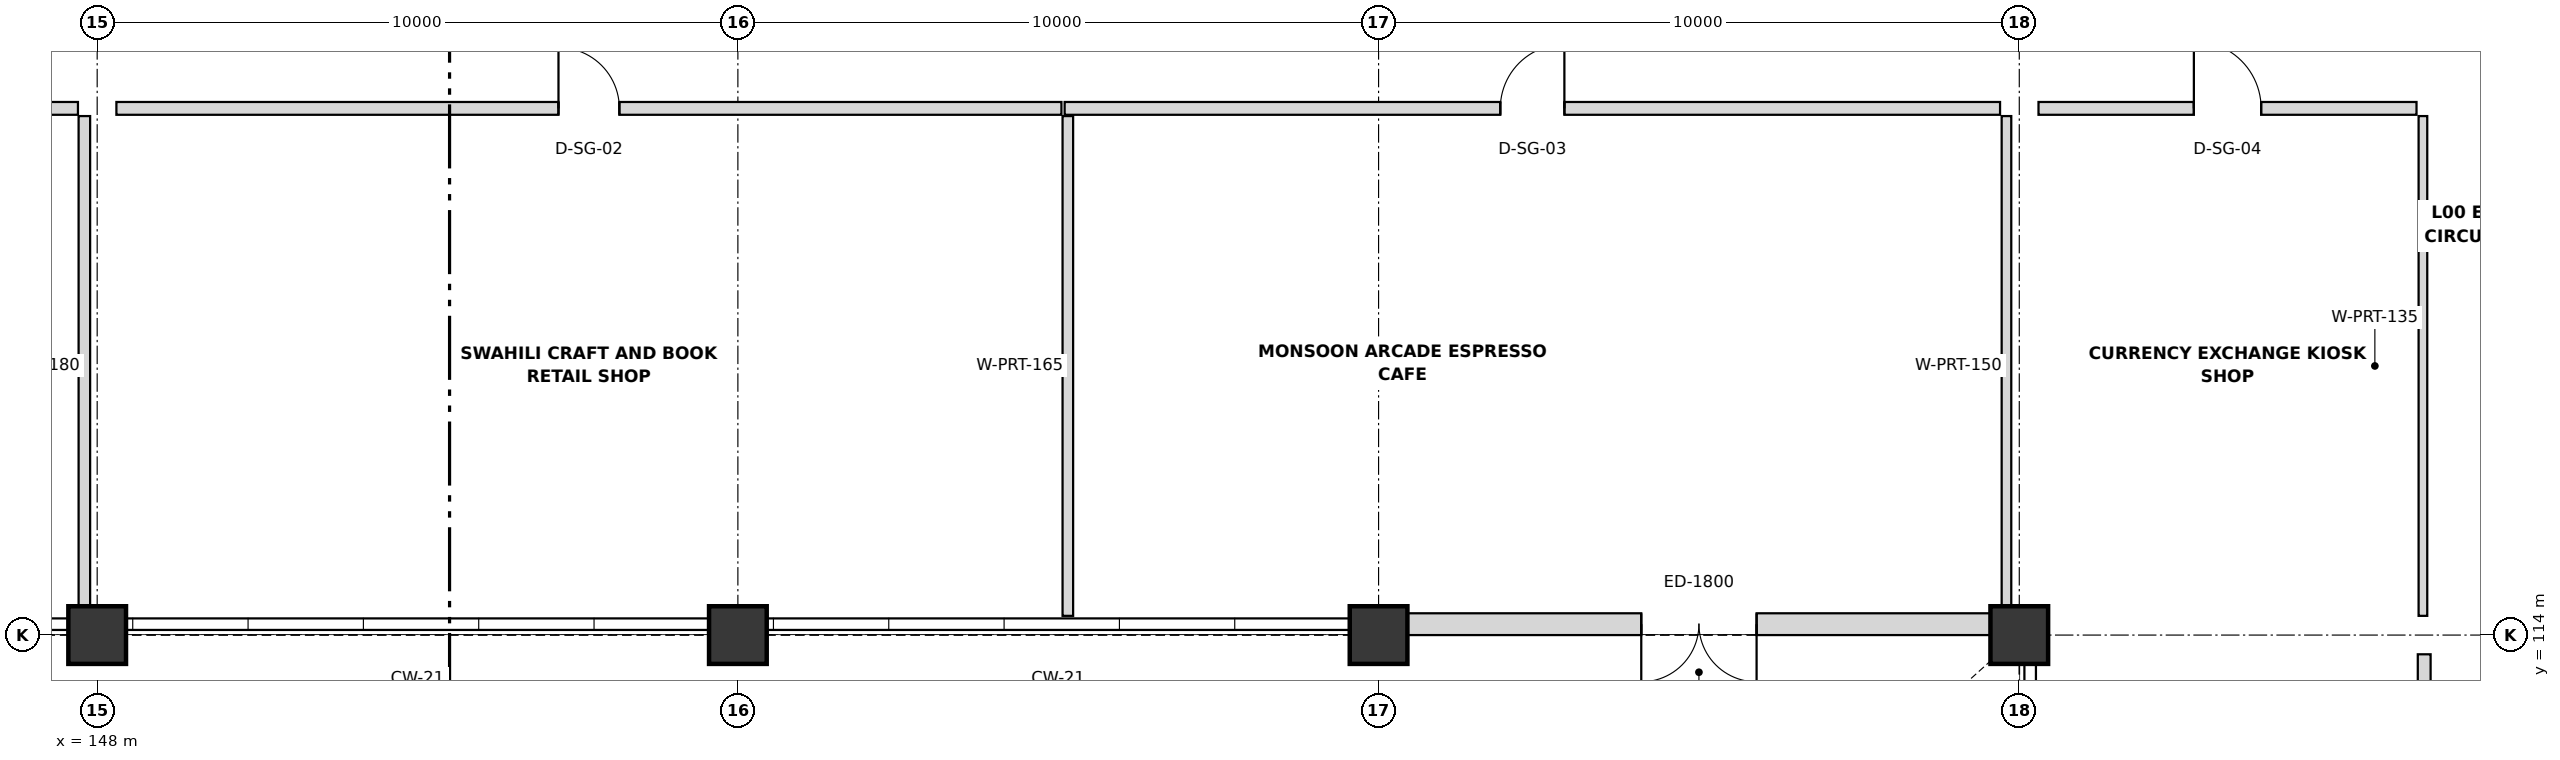
"""IFC4 building model, lengths in metres.
Left out: names, types, materials, properties, quantities, classifications, styles, units other than length and angle.
Written with IfcOpenShell. Run it as: python <this file> out.ifc"""

import sys

from ifc_helpers import new_model, si_unit, direction, frame, frame_2d, origin, origin_2d, place, context, subcontext, project, spatial, rectangle, extrude, element, fill, save


model = new_model("IFC4")
c1 = context("Model", 3, precision=1e-05, world=origin(), true_north=direction((0.0, 1.0)))
c2 = subcontext(c1, "Body", "Model", "MODEL_VIEW")
j1 = project(units=[si_unit("LENGTHUNIT", "METRE"), si_unit("PLANEANGLEUNIT", "RADIAN")], contexts=[c1])
p1 = place(None, origin())
s1 = spatial("IfcSite", under=j1, at=p1, CompositionType="ELEMENT")
p2 = place(p1, origin())
s2 = spatial("IfcBuilding", under=s1, at=p2, CompositionType="ELEMENT")
p3 = place(p2, origin())
s3 = spatial("IfcBuildingStorey", under=s2, at=p3, CompositionType="ELEMENT", Elevation=0.0)
for number, where, z_axis, x_axis in (
    (1, (148.0, 114.0, 0.0), (0.0, 0.0, 1.0), (1.0, 0.0, 0.0)),
    (2, (158.0, 114.0, 0.0), (0.0, 0.0, 1.0), (1.0, 0.0, 0.0)),
    (3, (168.0, 114.0, 0.0), (0.0, 0.0, 1.0), (1.0, 0.0, 0.0)),
    (4, (178.0, 114.0, 0.0), (0.0, 0.0, 1.0), (1.0, 0.0, 0.0)),
):
    element("IfcColumn", number, at=place(p3, frame(where, z_axis=z_axis, x_axis=x_axis)), inside=s3, PredefinedType="COLUMN", context=c2, shape_type="SweptSolid", body=[
        extrude(rectangle(XDim=0.9, YDim=0.9, at=origin_2d()), origin(), (0.0, 0.0, 1.0), 5.4),
    ])
p4 = place(p3, frame((177.555, 114.17, 0.0), z_axis=(0.0, 0.0, 1.0), x_axis=(-1.0, 0.0, 0.0)))
e5 = element("IfcWall", 5, at=p4, inside=s3, PredefinedType="SOLIDWALL", context=c2, shape_type="SweptSolid", body=[
    extrude(rectangle(XDim=9.11, YDim=0.34, at=frame_2d((4.555, 0.0))), origin(), (0.0, 0.0, 1.0), 4.258),
])
p5 = place(p4, frame((3.655, 0.0, 0.0)))
e6 = element("IfcOpeningElement", 6, at=p5, cuts=e5, PredefinedType="OPENING", context=c2, shape_type="SweptSolid", body=[
    extrude(rectangle(XDim=1.8, YDim=2.4, at=frame_2d((0.9, 1.2))), frame((0.0, 0.18, 0.0), z_axis=(0.0, -1.0, 0.0), x_axis=(1.0, 0.0, 0.0)), (0.0, 0.0, 1.0), 0.36),
])
p6 = place(p3, frame((131.8, 122.22, 0.0), z_axis=(0.0, 0.0, 1.0), x_axis=(1.0, 0.0, 0.0)))
e7 = element("IfcWall", 7, at=p6, inside=s3, PredefinedType="PARTITIONING", context=c2, shape_type="SweptSolid", body=[
    extrude(rectangle(XDim=15.9, YDim=0.2, at=frame_2d((7.95, 0.0))), origin(), (0.0, 0.0, 1.0), 4.358),
])
p7 = place(p6, frame((6.85, 0.0, 0.0)))
e8 = element("IfcOpeningElement", 8, at=p7, cuts=e7, PredefinedType="OPENING", context=c2, shape_type="SweptSolid", body=[
    extrude(rectangle(XDim=2.2, YDim=2.3, at=frame_2d((1.1, 1.15))), frame((0.0, 0.11, 0.0), z_axis=(0.0, -1.0, 0.0), x_axis=(1.0, 0.0, 0.0)), (0.0, 0.0, 1.0), 0.22),
])
p8 = place(p3, frame((147.8, 114.3, 0.0), z_axis=(0.0, 0.0, 1.0), x_axis=(0.0, 1.0, 0.0)))
e9 = element("IfcWall", 9, at=p8, inside=s3, PredefinedType="PARTITIONING", context=c2, shape_type="SweptSolid", body=[
    extrude(rectangle(XDim=7.8, YDim=0.18, at=frame_2d((3.9, 0.0))), origin(), (0.0, 0.0, 1.0), 4.258),
])
p9 = place(p3, frame((148.3, 122.22, 0.0), z_axis=(0.0, 0.0, 1.0), x_axis=(1.0, 0.0, 0.0)))
e10 = element("IfcWall", 10, at=p9, inside=s3, PredefinedType="PARTITIONING", context=c2, shape_type="SweptSolid", body=[
    extrude(rectangle(XDim=14.75, YDim=0.2, at=frame_2d((7.375, 0.0))), origin(), (0.0, 0.0, 1.0), 4.358),
])
p10 = place(p9, frame((6.9, 0.0, 0.0)))
e11 = element("IfcOpeningElement", 11, at=p10, cuts=e10, PredefinedType="OPENING", context=c2, shape_type="SweptSolid", body=[
    extrude(rectangle(XDim=0.95, YDim=2.1, at=frame_2d((0.475, 1.05))), frame((0.0, 0.11, 0.0), z_axis=(0.0, -1.0, 0.0), x_axis=(1.0, 0.0, 0.0)), (0.0, 0.0, 1.0), 0.22),
])
p11 = place(p3, frame((163.15, 114.3, 0.0), z_axis=(0.0, 0.0, 1.0), x_axis=(0.0, 1.0, 0.0)))
e12 = element("IfcWall", 12, at=p11, inside=s3, PredefinedType="PARTITIONING", context=c2, shape_type="SweptSolid", body=[
    extrude(rectangle(XDim=7.8, YDim=0.165, at=frame_2d((3.9, 0.0))), origin(), (0.0, 0.0, 1.0), 4.258),
])
p12 = place(p3, frame((163.1, 122.22, 0.0), z_axis=(0.0, 0.0, 1.0), x_axis=(1.0, 0.0, 0.0)))
e13 = element("IfcWall", 13, at=p12, inside=s3, PredefinedType="PARTITIONING", context=c2, shape_type="SweptSolid", body=[
    extrude(rectangle(XDim=14.6, YDim=0.2, at=frame_2d((7.3, 0.0))), origin(), (0.0, 0.0, 1.0), 4.358),
])
p13 = place(p12, frame((6.8, 0.0, 0.0)))
e14 = element("IfcOpeningElement", 14, at=p13, cuts=e13, PredefinedType="OPENING", context=c2, shape_type="SweptSolid", body=[
    extrude(rectangle(XDim=1.0, YDim=2.1, at=frame_2d((0.5, 1.05))), frame((0.0, 0.11, 0.0), z_axis=(0.0, -1.0, 0.0), x_axis=(1.0, 0.0, 0.0)), (0.0, 0.0, 1.0), 0.22),
])
p14 = place(p3, frame((177.8, 114.3, 0.0), z_axis=(0.0, 0.0, 1.0), x_axis=(0.0, 1.0, 0.0)))
e15 = element("IfcWall", 15, at=p14, inside=s3, PredefinedType="PARTITIONING", context=c2, shape_type="SweptSolid", body=[
    extrude(rectangle(XDim=7.8, YDim=0.15, at=frame_2d((3.9, 0.0))), origin(), (0.0, 0.0, 1.0), 4.258),
])
p15 = place(p3, frame((178.3, 122.22, 0.0), z_axis=(0.0, 0.0, 1.0), x_axis=(1.0, 0.0, 0.0)))
e16 = element("IfcWall", 16, at=p15, inside=s3, PredefinedType="PARTITIONING", context=c2, shape_type="SweptSolid", body=[
    extrude(rectangle(XDim=5.9, YDim=0.2, at=frame_2d((2.95, 0.0))), origin(), (0.0, 0.0, 1.0), 4.358),
])
p16 = place(p15, frame((2.425, 0.0, 0.0)))
e17 = element("IfcOpeningElement", 17, at=p16, cuts=e16, PredefinedType="OPENING", context=c2, shape_type="SweptSolid", body=[
    extrude(rectangle(XDim=1.05, YDim=2.1, at=frame_2d((0.525, 1.05))), frame((0.0, 0.11, 0.0), z_axis=(0.0, -1.0, 0.0), x_axis=(1.0, 0.0, 0.0)), (0.0, 0.0, 1.0), 0.22),
])
p17 = place(p3, frame((184.3, 114.3, 0.0), z_axis=(0.0, 0.0, 1.0), x_axis=(0.0, 1.0, 0.0)))
e18 = element("IfcWall", 18, at=p17, inside=s3, PredefinedType="PARTITIONING", context=c2, shape_type="SweptSolid", body=[
    extrude(rectangle(XDim=7.8, YDim=0.135, at=frame_2d((3.9, 0.0))), origin(), (0.0, 0.0, 1.0), 4.258),
])
p18 = place(p3, frame((184.32, 90.6, 0.0), z_axis=(0.0, 0.0, 1.0), x_axis=(0.0, 1.0, 0.0)))
e19 = element("IfcWall", 19, at=p18, inside=s3, PredefinedType="PARTITIONING", context=c2, shape_type="SweptSolid", body=[
    extrude(rectangle(XDim=23.1, YDim=0.2, at=frame_2d((11.55, 0.0))), origin(), (0.0, 0.0, 1.0), 4.258),
])
p19 = place(p18, frame((10.875, 0.0, 0.0)))
e20 = element("IfcOpeningElement", 20, at=p19, cuts=e19, PredefinedType="OPENING", context=c2, shape_type="SweptSolid", body=[
    extrude(rectangle(XDim=1.05, YDim=2.2, at=frame_2d((0.525, 1.1))), frame((0.0, 0.11, 0.0), z_axis=(0.0, -1.0, 0.0), x_axis=(1.0, 0.0, 0.0)), (0.0, 0.0, 1.0), 0.22),
])
p20 = place(p5, origin())
e21 = element("IfcDoor", 21, at=p20, inside=s3, OperationType="DOUBLE_DOOR_SINGLE_SWING", PredefinedType="DOOR", context=c2, shape_type="SweptSolid", body=[
    extrude(rectangle(XDim=1.8, YDim=2.4, at=frame_2d((0.9, 1.2))), frame((0.0, 0.025, 0.0), z_axis=(0.0, -1.0, 0.0), x_axis=(1.0, 0.0, 0.0)), (0.0, 0.0, 1.0), 0.05),
])
fill(e6, e21)
p21 = place(p10, origin())
e22 = element("IfcDoor", 22, at=p21, inside=s3, OperationType="SINGLE_SWING_LEFT", PredefinedType="DOOR", context=c2, shape_type="SweptSolid", body=[
    extrude(rectangle(XDim=0.95, YDim=2.1, at=frame_2d((0.475, 1.05))), frame((0.0, 0.025, 0.0), z_axis=(0.0, -1.0, 0.0), x_axis=(1.0, 0.0, 0.0)), (0.0, 0.0, 1.0), 0.05),
])
fill(e11, e22)
p22 = place(p13, origin())
e23 = element("IfcDoor", 23, at=p22, inside=s3, OperationType="SINGLE_SWING_RIGHT", PredefinedType="DOOR", context=c2, shape_type="SweptSolid", body=[
    extrude(rectangle(XDim=1.0, YDim=2.1, at=frame_2d((0.5, 1.05))), frame((0.0, 0.025, 0.0), z_axis=(0.0, -1.0, 0.0), x_axis=(1.0, 0.0, 0.0)), (0.0, 0.0, 1.0), 0.05),
])
fill(e14, e23)
p23 = place(p16, origin())
e24 = element("IfcDoor", 24, at=p23, inside=s3, OperationType="SINGLE_SWING_LEFT", PredefinedType="DOOR", context=c2, shape_type="SweptSolid", body=[
    extrude(rectangle(XDim=1.05, YDim=2.1, at=frame_2d((0.525, 1.05))), frame((0.0, 0.025, 0.0), z_axis=(0.0, -1.0, 0.0), x_axis=(1.0, 0.0, 0.0)), (0.0, 0.0, 1.0), 0.05),
])
fill(e17, e24)
save(model, sys.argv[1])
